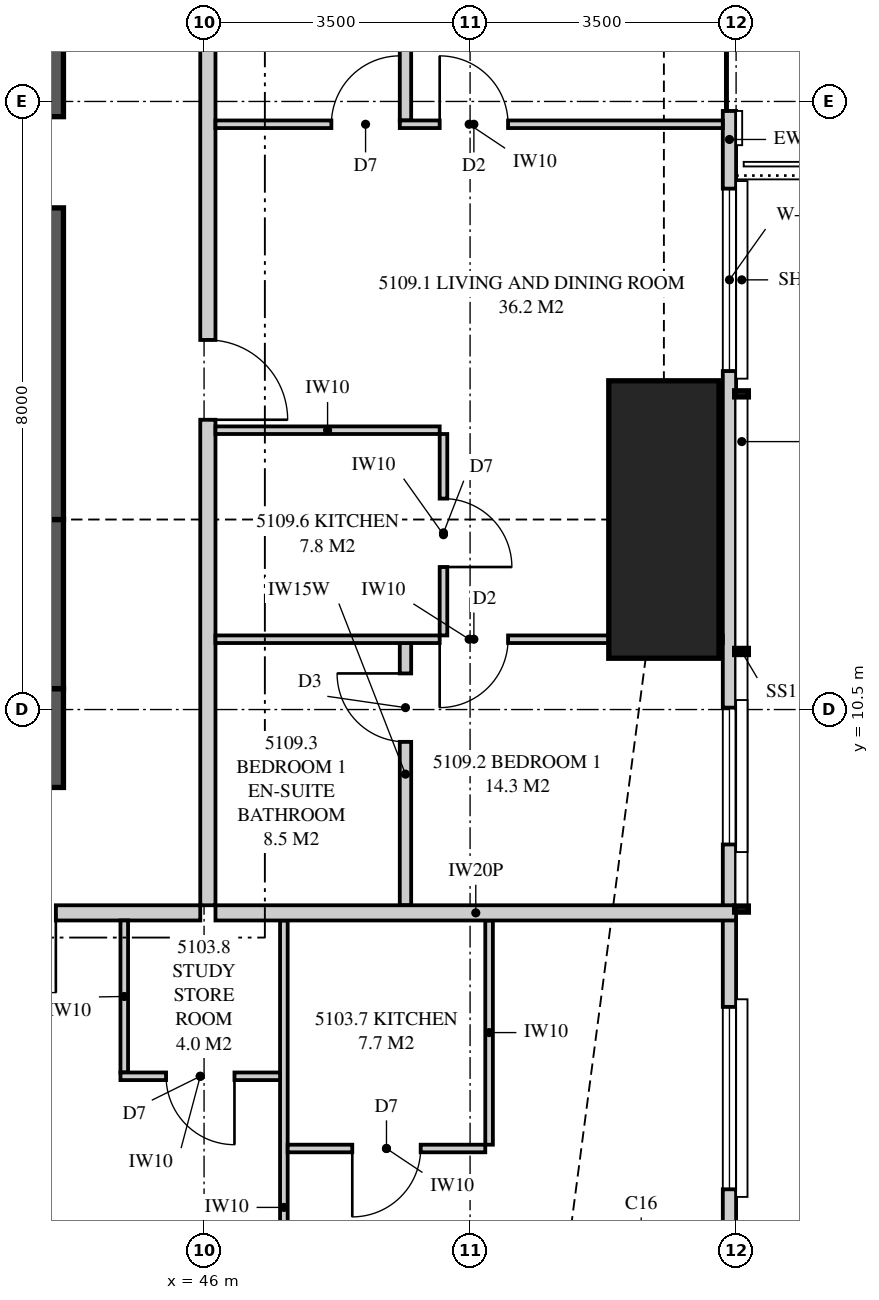
"""IFC4 building model, lengths in metres.
Left out: names, types, materials, properties, quantities, classifications, styles, units other than length and angle.
Written with IfcOpenShell. Run it as: python <this file> out.ifc"""

import sys

from ifc_helpers import new_model, si_unit, direction, frame, frame_2d, origin, origin_2d, place, context, subcontext, project, spatial, polyline, rectangle, outline, extrude, element, fill, save


model = new_model("IFC4")
c1 = context("Model", 3, precision=1e-05, world=origin(), true_north=direction((0.0, 1.0)))
c2 = subcontext(c1, "Body", "Model", "MODEL_VIEW")
j1 = project(units=[si_unit("LENGTHUNIT", "METRE"), si_unit("PLANEANGLEUNIT", "RADIAN")], contexts=[c1])
p1 = place(None, origin())
s1 = spatial("IfcSite", under=j1, at=p1, CompositionType="ELEMENT")
p2 = place(p1, origin())
s2 = spatial("IfcBuilding", under=s1, at=p2, CompositionType="ELEMENT")
p3 = place(p2, frame((0.0, 0.0, 187.85)))
s3 = spatial("IfcBuildingStorey", under=s2, at=p3, CompositionType="ELEMENT", Elevation=187.85)
p4 = place(p3, frame((52.05, 13.0, 0.0), z_axis=(0.0, 0.0, 1.0), x_axis=(1.0, 0.0, 0.0)))
e1 = element("IfcColumn", 1, at=p4, inside=s3, PredefinedType="COLUMN", context=c2, shape_type="SweptSolid", body=[
    extrude(rectangle(XDim=1.45, YDim=3.65, at=origin_2d()), origin(), (0.0, 0.0, 1.0), 3.35),
])
p5 = place(p3, frame((35.9, 10.125, 0.0), z_axis=(0.0, 0.0, 1.0), x_axis=(1.0, 0.0, 0.0)))
e2 = element("IfcWall", 2, at=p5, inside=s3, PredefinedType="SHEAR", context=c2, shape_type="SweptSolid", body=[
    extrude(rectangle(XDim=8.25, YDim=1.3, at=frame_2d((4.125, 0.0))), origin(), (0.0, 0.0, 1.0), 3.35),
])
p6 = place(p5, frame((2.7, 0.0, 0.0)))
e3 = element("IfcOpeningElement", 3, at=p6, cuts=e2, PredefinedType="OPENING", context=c2, shape_type="SweptSolid", body=[
    extrude(rectangle(XDim=1.0, YDim=2.1, at=frame_2d((0.5, 1.05))), frame((0.0, 0.66, 0.0), z_axis=(0.0, -1.0, 0.0), x_axis=(1.0, 0.0, 0.0)), (0.0, 0.0, 1.0), 1.32),
])
p7 = place(p3, frame((43.8, 10.775, 0.0), z_axis=(0.0, 0.0, 1.0), x_axis=(0.0, 1.0, 0.0)))
e4 = element("IfcWall", 4, at=p7, inside=s3, PredefinedType="SHEAR", context=c2, shape_type="SweptSolid", body=[
    extrude(rectangle(XDim=2.225, YDim=0.7, at=frame_2d((1.113, 0.0))), origin(), (0.0, 0.0, 1.0), 3.35),
])
p8 = place(p3, frame((43.8, 13.0, 0.0), z_axis=(0.0, 0.0, 1.0), x_axis=(0.0, 1.0, 0.0)))
e5 = element("IfcWall", 5, at=p8, inside=s3, PredefinedType="SHEAR", context=c2, shape_type="SweptSolid", body=[
    extrude(rectangle(XDim=6.3, YDim=0.7, at=frame_2d((3.15, 0.0))), origin(), (0.0, 0.0, 1.0), 3.35),
])
p9 = place(p8, frame((4.1, 0.0, 0.0)))
e6 = element("IfcOpeningElement", 6, at=p9, cuts=e5, PredefinedType="OPENING", context=c2, shape_type="SweptSolid", body=[
    extrude(rectangle(XDim=1.2, YDim=2.2, at=frame_2d((0.6, 1.1))), frame((0.0, 0.36, 0.0), z_axis=(0.0, -1.0, 0.0), x_axis=(1.0, 0.0, 0.0)), (0.0, 0.0, 1.0), 0.72),
])
p10 = place(p3, frame((52.913, 3.051, 0.0), z_axis=(0.0, 0.0, 1.0), x_axis=(0.0, 1.0, 0.0)))
e7 = element("IfcWall", 7, at=p10, inside=s3, PredefinedType="SOLIDWALL", context=c2, shape_type="SweptSolid", body=[
    extrude(outline(polyline([(0.0, 0.0), (29.897, 0.0), (29.897, 3.11), (22.167, 3.11), (22.167, 2.15), (22.074, 2.15), (22.074, 3.11), (21.949, 3.11), (21.949, 2.15), (9.949, 2.15), (9.949, 3.11), (9.847, 3.11), (9.847, 2.15), (9.706, 2.15), (9.706, 3.11), (0.0, 3.11), (0.0, 0.0)])), frame((0.0, 0.087, 0.0), z_axis=(0.0, -1.0, 0.0), x_axis=(1.0, 0.0, 0.0)), (0.0, 0.0, 1.0), 0.175),
])
p11 = place(p10, frame((1.137, 0.0, 0.4)))
e8 = element("IfcOpeningElement", 8, at=p11, cuts=e7, PredefinedType="OPENING", context=c2, shape_type="SweptSolid", body=[
    extrude(rectangle(XDim=2.4, YDim=1.7, at=frame_2d((1.2, 0.85))), frame((0.0, 0.097, 0.0), z_axis=(0.0, -1.0, 0.0), x_axis=(1.0, 0.0, 0.0)), (0.0, 0.0, 1.0), 0.195),
])
p12 = place(p10, frame((5.674, 0.0, 0.4)))
e9 = element("IfcOpeningElement", 9, at=p12, cuts=e7, PredefinedType="OPENING", context=c2, shape_type="SweptSolid", body=[
    extrude(rectangle(XDim=1.8, YDim=1.7, at=frame_2d((0.9, 0.85))), frame((0.0, 0.097, 0.0), z_axis=(0.0, -1.0, 0.0), x_axis=(1.0, 0.0, 0.0)), (0.0, 0.0, 1.0), 0.195),
])
p13 = place(p10, frame((11.902, 0.0, 0.4)))
e10 = element("IfcOpeningElement", 10, at=p13, cuts=e7, PredefinedType="OPENING", context=c2, shape_type="SweptSolid", body=[
    extrude(rectangle(XDim=2.4, YDim=1.7, at=frame_2d((1.2, 0.85))), frame((0.0, 0.097, 0.0), z_axis=(0.0, -1.0, 0.0), x_axis=(1.0, 0.0, 0.0)), (0.0, 0.0, 1.0), 0.195),
])
p14 = place(p10, frame((15.324, 0.0, 0.0)))
e11 = element("IfcOpeningElement", 11, at=p14, cuts=e7, PredefinedType="OPENING", context=c2, shape_type="SweptSolid", body=[
    extrude(rectangle(XDim=1.8, YDim=2.1, at=frame_2d((0.9, 1.05))), frame((0.0, 0.097, 0.0), z_axis=(0.0, -1.0, 0.0), x_axis=(1.0, 0.0, 0.0)), (0.0, 0.0, 1.0), 0.195),
])
p15 = place(p10, frame((23.874, 0.0, 0.4)))
e12 = element("IfcOpeningElement", 12, at=p15, cuts=e7, PredefinedType="OPENING", context=c2, shape_type="SweptSolid", body=[
    extrude(rectangle(XDim=1.8, YDim=1.7, at=frame_2d((0.9, 0.85))), frame((0.0, 0.097, 0.0), z_axis=(0.0, -1.0, 0.0), x_axis=(1.0, 0.0, 0.0)), (0.0, 0.0, 1.0), 0.195),
])
p16 = place(p10, frame((26.871, 0.0, 0.4)))
e13 = element("IfcOpeningElement", 13, at=p16, cuts=e7, PredefinedType="OPENING", context=c2, shape_type="SweptSolid", body=[
    extrude(rectangle(XDim=1.8, YDim=1.7, at=frame_2d((0.9, 0.85))), frame((0.0, 0.097, 0.0), z_axis=(0.0, -1.0, 0.0), x_axis=(1.0, 0.0, 0.0)), (0.0, 0.0, 1.0), 0.195),
])
p17 = place(p3, frame((34.1, 7.825, 0.0), z_axis=(0.0, 0.0, 1.0), x_axis=(1.0, 0.0, 0.0)))
e14 = element("IfcWall", 14, at=p17, inside=s3, PredefinedType="PARTITIONING", context=c2, shape_type="SweptSolid", body=[
    extrude(outline(polyline([(0.0, 0.0), (11.85, 0.0), (11.85, 3.11), (8.987, 3.11), (8.987, 2.541), (8.312, 2.541), (8.312, 3.11), (0.0, 3.11), (0.0, 0.0)])), frame((0.0, 0.1, 0.0), z_axis=(0.0, -1.0, 0.0), x_axis=(1.0, 0.0, 0.0)), (0.0, 0.0, 1.0), 0.2),
])
p18 = place(p17, frame((8.9, 0.0, 0.0)))
e15 = element("IfcOpeningElement", 15, at=p18, cuts=e14, PredefinedType="OPENING", context=c2, shape_type="SweptSolid", body=[
    extrude(rectangle(XDim=1.05, YDim=2.2, at=frame_2d((0.525, 1.1))), frame((0.0, 0.11, 0.0), z_axis=(0.0, -1.0, 0.0), x_axis=(1.0, 0.0, 0.0)), (0.0, 0.0, 1.0), 0.22),
])
p19 = place(p3, frame((47.05, 0.175, 0.0), z_axis=(0.0, 0.0, 1.0), x_axis=(0.0, 1.0, 0.0)))
e16 = element("IfcWall", 16, at=p19, inside=s3, PredefinedType="PARTITIONING", context=c2, shape_type="SweptSolid", body=[
    extrude(outline(polyline([(0.0, 0.0), (7.55, 0.0), (7.55, 3.11), (2.409, 3.11), (2.409, 2.15), (0.663, 2.15), (0.663, 3.11), (0.0, 3.11), (0.0, 0.0)])), frame((0.0, 0.05, 0.0), z_axis=(0.0, -1.0, 0.0), x_axis=(1.0, 0.0, 0.0)), (0.0, 0.0, 1.0), 0.1),
])
p20 = place(p19, frame((1.825, 0.0, 0.0)))
e17 = element("IfcOpeningElement", 17, at=p20, cuts=e16, PredefinedType="OPENING", context=c2, shape_type="SweptSolid", body=[
    extrude(rectangle(XDim=0.9, YDim=2.1, at=frame_2d((0.45, 1.05))), frame((0.0, 0.06, 0.0), z_axis=(0.0, -1.0, 0.0), x_axis=(1.0, 0.0, 0.0)), (0.0, 0.0, 1.0), 0.12),
])
p21 = place(p3, frame((47.1, 4.725, 0.0), z_axis=(0.0, 0.0, 1.0), x_axis=(1.0, 0.0, 0.0)))
e18 = element("IfcWall", 18, at=p21, inside=s3, PredefinedType="PARTITIONING", context=c2, shape_type="SweptSolid", body=[
    extrude(rectangle(XDim=2.6, YDim=0.1, at=frame_2d((1.3, 0.0))), origin(), (0.0, 0.0, 1.0), 3.11),
])
p22 = place(p21, frame((0.85, 0.0, 0.0)))
e19 = element("IfcOpeningElement", 19, at=p22, cuts=e18, PredefinedType="OPENING", context=c2, shape_type="SweptSolid", body=[
    extrude(rectangle(XDim=0.9, YDim=2.1, at=frame_2d((0.45, 1.05))), frame((0.0, 0.06, 0.0), z_axis=(0.0, -1.0, 0.0), x_axis=(1.0, 0.0, 0.0)), (0.0, 0.0, 1.0), 0.12),
])
p23 = place(p3, frame((49.75, 4.775, 0.0), z_axis=(0.0, 0.0, 1.0), x_axis=(0.0, 1.0, 0.0)))
e20 = element("IfcWall", 20, at=p23, inside=s3, PredefinedType="PARTITIONING", context=c2, shape_type="SweptSolid", body=[
    extrude(rectangle(XDim=2.95, YDim=0.1, at=frame_2d((1.475, 0.0))), origin(), (0.0, 0.0, 1.0), 3.11),
])
p24 = place(p3, frame((46.15, 7.825, 0.0), z_axis=(0.0, 0.0, 1.0), x_axis=(1.0, 0.0, 0.0)))
e21 = element("IfcWall", 21, at=p24, inside=s3, PredefinedType="PARTITIONING", context=c2, shape_type="SweptSolid", body=[
    extrude(outline(polyline([(0.0, 0.0), (6.85, 0.0), (6.85, 3.11), (6.138, 3.11), (6.138, 2.15), (4.303, 2.15), (4.303, 3.11), (0.0, 3.11), (0.0, 0.0)])), frame((0.0, 0.1, 0.0), z_axis=(0.0, -1.0, 0.0), x_axis=(1.0, 0.0, 0.0)), (0.0, 0.0, 1.0), 0.2),
])
p25 = place(p3, frame((46.05, 7.925, 0.0), z_axis=(0.0, 0.0, 1.0), x_axis=(0.0, 1.0, 0.0)))
e22 = element("IfcWall", 22, at=p25, inside=s3, PredefinedType="PARTITIONING", context=c2, shape_type="SweptSolid", body=[
    extrude(outline(polyline([(0.0, 0.0), (13.775, 0.0), (13.775, 3.11), (5.412, 3.11), (5.412, 2.541), (4.738, 2.541), (4.738, 3.11), (0.0, 3.11), (0.0, 0.0)])), frame((0.0, 0.1, 0.0), z_axis=(0.0, -1.0, 0.0), x_axis=(1.0, 0.0, 0.0)), (0.0, 0.0, 1.0), 0.2),
])
p26 = place(p25, frame((6.387, 0.0, 0.0)))
e23 = element("IfcOpeningElement", 23, at=p26, cuts=e22, PredefinedType="OPENING", context=c2, shape_type="SweptSolid", body=[
    extrude(rectangle(XDim=1.05, YDim=2.2, at=frame_2d((0.525, 1.1))), frame((0.0, 0.11, 0.0), z_axis=(0.0, -1.0, 0.0), x_axis=(1.0, 0.0, 0.0)), (0.0, 0.0, 1.0), 0.22),
])
p27 = place(p3, frame((52.825, 11.425, 0.0), z_axis=(0.0, 0.0, 1.0), x_axis=(-1.0, 0.0, 0.0)))
e24 = element("IfcWall", 24, at=p27, inside=s3, PredefinedType="PARTITIONING", context=c2, shape_type="SweptSolid", body=[
    extrude(outline(polyline([(0.0, 0.0), (6.675, 0.0), (6.675, 3.11), (1.849, 3.11), (1.849, 2.15), (0.115, 2.15), (0.115, 3.11), (0.0, 3.11), (0.0, 0.0)])), frame((0.0, 0.05, 0.0), z_axis=(0.0, -1.0, 0.0), x_axis=(1.0, 0.0, 0.0)), (0.0, 0.0, 1.0), 0.1),
])
p28 = place(p27, frame((2.825, 0.0, 0.0)))
e25 = element("IfcOpeningElement", 25, at=p28, cuts=e24, PredefinedType="OPENING", context=c2, shape_type="SweptSolid", body=[
    extrude(rectangle(XDim=0.9, YDim=2.1, at=frame_2d((0.45, 1.05))), frame((0.0, 0.06, 0.0), z_axis=(0.0, -1.0, 0.0), x_axis=(1.0, 0.0, 0.0)), (0.0, 0.0, 1.0), 0.12),
])
p29 = place(p3, frame((52.825, 18.2, 0.0), z_axis=(0.0, 0.0, 1.0), x_axis=(-1.0, 0.0, 0.0)))
e26 = element("IfcWall", 26, at=p29, inside=s3, PredefinedType="PARTITIONING", context=c2, shape_type="SweptSolid", body=[
    extrude(outline(polyline([(0.0, 0.0), (6.675, 0.0), (6.675, 3.11), (1.635, 3.11), (1.635, 2.15), (0.0, 2.15), (0.0, 3.11), (0.0, 0.0)])), frame((0.0, 0.05, 0.0), z_axis=(0.0, -1.0, 0.0), x_axis=(1.0, 0.0, 0.0)), (0.0, 0.0, 1.0), 0.1),
])
p30 = place(p29, frame((2.825, 0.0, 0.0)))
e27 = element("IfcOpeningElement", 27, at=p30, cuts=e26, PredefinedType="OPENING", context=c2, shape_type="SweptSolid", body=[
    extrude(rectangle(XDim=0.9, YDim=2.1, at=frame_2d((0.45, 1.05))), frame((0.0, 0.06, 0.0), z_axis=(0.0, -1.0, 0.0), x_axis=(1.0, 0.0, 0.0)), (0.0, 0.0, 1.0), 0.12),
])
p31 = place(p29, frame((4.25, 0.0, 0.0)))
e28 = element("IfcOpeningElement", 28, at=p31, cuts=e26, PredefinedType="OPENING", context=c2, shape_type="SweptSolid", body=[
    extrude(rectangle(XDim=0.9, YDim=2.1, at=frame_2d((0.45, 1.05))), frame((0.0, 0.06, 0.0), z_axis=(0.0, -1.0, 0.0), x_axis=(1.0, 0.0, 0.0)), (0.0, 0.0, 1.0), 0.12),
])
p32 = place(p3, frame((48.65, 7.925, 0.0), z_axis=(0.0, 0.0, 1.0), x_axis=(0.0, 1.0, 0.0)))
e29 = element("IfcWall", 29, at=p32, inside=s3, PredefinedType="PLUMBINGWALL", context=c2, shape_type="SweptSolid", body=[
    extrude(rectangle(XDim=3.45, YDim=0.15, at=frame_2d((1.725, 0.0))), origin(), (0.0, 0.0, 1.0), 3.11),
])
p33 = place(p32, frame((2.15, 0.0, 0.0)))
e30 = element("IfcOpeningElement", 30, at=p33, cuts=e29, PredefinedType="OPENING", context=c2, shape_type="SweptSolid", body=[
    extrude(rectangle(XDim=0.9, YDim=2.1, at=frame_2d((0.45, 1.05))), frame((0.0, 0.085, 0.0), z_axis=(0.0, -1.0, 0.0), x_axis=(1.0, 0.0, 0.0)), (0.0, 0.0, 1.0), 0.17),
])
p34 = place(p3, frame((48.65, 18.25, 0.0), z_axis=(0.0, 0.0, 1.0), x_axis=(0.0, 1.0, 0.0)))
e31 = element("IfcWall", 31, at=p34, inside=s3, PredefinedType="PLUMBINGWALL", context=c2, shape_type="SweptSolid", body=[
    extrude(rectangle(XDim=3.45, YDim=0.15, at=frame_2d((1.725, 0.0))), origin(), (0.0, 0.0, 1.0), 3.11),
])
p35 = place(p3, frame((49.15, 11.475, 0.0), z_axis=(0.0, 0.0, 1.0), x_axis=(0.0, 1.0, 0.0)))
e32 = element("IfcWall", 32, at=p35, inside=s3, PredefinedType="PARTITIONING", context=c2, shape_type="SweptSolid", body=[
    extrude(outline(polyline([(0.0, 0.0), (2.65, 0.0), (2.65, 3.11), (1.812, 3.11), (1.812, 2.541), (1.238, 2.541), (1.238, 3.11), (0.0, 3.11), (0.0, 0.0)])), frame((0.0, 0.05, 0.0), z_axis=(0.0, -1.0, 0.0), x_axis=(1.0, 0.0, 0.0)), (0.0, 0.0, 1.0), 0.1),
])
p36 = place(p35, frame((0.9, 0.0, 0.0)))
e33 = element("IfcOpeningElement", 33, at=p36, cuts=e32, PredefinedType="OPENING", context=c2, shape_type="SweptSolid", body=[
    extrude(rectangle(XDim=0.9, YDim=2.1, at=frame_2d((0.45, 1.05))), frame((0.0, 0.06, 0.0), z_axis=(0.0, -1.0, 0.0), x_axis=(1.0, 0.0, 0.0)), (0.0, 0.0, 1.0), 0.12),
])
p37 = place(p3, frame((49.1, 14.175, 0.0), z_axis=(0.0, 0.0, 1.0), x_axis=(-1.0, 0.0, 0.0)))
e34 = element("IfcWall", 34, at=p37, inside=s3, PredefinedType="PARTITIONING", context=c2, shape_type="SweptSolid", body=[
    extrude(rectangle(XDim=2.95, YDim=0.1, at=frame_2d((1.475, 0.0))), origin(), (0.0, 0.0, 1.0), 3.11),
])
p38 = place(p3, frame((47.0, 5.675, 0.0), z_axis=(0.0, 0.0, 1.0), x_axis=(-1.0, 0.0, 0.0)))
e35 = element("IfcWall", 35, at=p38, inside=s3, PredefinedType="PARTITIONING", context=c2, shape_type="SweptSolid", body=[
    extrude(rectangle(XDim=2.1, YDim=0.1, at=frame_2d((1.05, 0.0))), origin(), (0.0, 0.0, 1.0), 3.11),
])
p39 = place(p38, frame((0.6, 0.0, 0.0)))
e36 = element("IfcOpeningElement", 36, at=p39, cuts=e35, PredefinedType="OPENING", context=c2, shape_type="SweptSolid", body=[
    extrude(rectangle(XDim=0.9, YDim=2.1, at=frame_2d((0.45, 1.05))), frame((0.0, 0.06, 0.0), z_axis=(0.0, -1.0, 0.0), x_axis=(1.0, 0.0, 0.0)), (0.0, 0.0, 1.0), 0.12),
])
p40 = place(p3, frame((44.95, 7.725, 0.0), z_axis=(0.0, 0.0, 1.0), x_axis=(0.0, -1.0, 0.0)))
e37 = element("IfcWall", 37, at=p40, inside=s3, PredefinedType="PARTITIONING", context=c2, shape_type="SweptSolid", body=[
    extrude(rectangle(XDim=2.0, YDim=0.1, at=frame_2d((1.0, 0.0))), origin(), (0.0, 0.0, 1.0), 3.11),
])
p41 = place(p11, origin())
e38 = element("IfcWindow", 38, at=p41, inside=s3, PartitioningType="SINGLE_PANEL", PredefinedType="WINDOW", context=c2, shape_type="SweptSolid", body=[
    extrude(rectangle(XDim=2.4, YDim=1.7, at=frame_2d((1.2, 0.85))), frame((0.0, 0.03, 0.0), z_axis=(0.0, -1.0, 0.0), x_axis=(1.0, 0.0, 0.0)), (0.0, 0.0, 1.0), 0.06),
])
fill(e8, e38)
p42 = place(p12, origin())
e39 = element("IfcWindow", 39, at=p42, inside=s3, PartitioningType="SINGLE_PANEL", PredefinedType="WINDOW", context=c2, shape_type="SweptSolid", body=[
    extrude(rectangle(XDim=1.8, YDim=1.7, at=frame_2d((0.9, 0.85))), frame((0.0, 0.03, 0.0), z_axis=(0.0, -1.0, 0.0), x_axis=(1.0, 0.0, 0.0)), (0.0, 0.0, 1.0), 0.06),
])
fill(e9, e39)
p43 = place(p13, origin())
e40 = element("IfcWindow", 40, at=p43, inside=s3, PartitioningType="SINGLE_PANEL", PredefinedType="WINDOW", context=c2, shape_type="SweptSolid", body=[
    extrude(rectangle(XDim=2.4, YDim=1.7, at=frame_2d((1.2, 0.85))), frame((0.0, 0.03, 0.0), z_axis=(0.0, -1.0, 0.0), x_axis=(1.0, 0.0, 0.0)), (0.0, 0.0, 1.0), 0.06),
])
fill(e10, e40)
p44 = place(p14, origin())
e41 = element("IfcDoor", 41, at=p44, inside=s3, OperationType="SLIDING_TO_LEFT", PredefinedType="DOOR", context=c2, shape_type="SweptSolid", body=[
    extrude(rectangle(XDim=1.8, YDim=2.1, at=frame_2d((0.9, 1.05))), frame((0.0, 0.025, 0.0), z_axis=(0.0, -1.0, 0.0), x_axis=(1.0, 0.0, 0.0)), (0.0, 0.0, 1.0), 0.05),
])
fill(e11, e41)
p45 = place(p18, frame((1.05, 0.0, 0.0), z_axis=(0.0, 0.0, 1.0), x_axis=(-1.0, 0.0, 0.0)))
e42 = element("IfcDoor", 42, at=p45, inside=s3, OperationType="SINGLE_SWING_LEFT", PredefinedType="DOOR", context=c2, shape_type="SweptSolid", body=[
    extrude(rectangle(XDim=1.05, YDim=2.2, at=frame_2d((0.525, 1.1))), frame((0.0, 0.025, 0.0), z_axis=(0.0, -1.0, 0.0), x_axis=(1.0, 0.0, 0.0)), (0.0, 0.0, 1.0), 0.05),
])
fill(e15, e42)
p46 = place(p22, frame((0.9, 0.0, 0.0), z_axis=(0.0, 0.0, 1.0), x_axis=(-1.0, 0.0, 0.0)))
e43 = element("IfcDoor", 43, at=p46, inside=s3, OperationType="SINGLE_SWING_RIGHT", PredefinedType="DOOR", context=c2, shape_type="SweptSolid", body=[
    extrude(rectangle(XDim=0.9, YDim=2.1, at=frame_2d((0.45, 1.05))), frame((0.0, 0.025, 0.0), z_axis=(0.0, -1.0, 0.0), x_axis=(1.0, 0.0, 0.0)), (0.0, 0.0, 1.0), 0.05),
])
fill(e19, e43)
p47 = place(p26, frame((1.05, 0.0, 0.0), z_axis=(0.0, 0.0, 1.0), x_axis=(-1.0, 0.0, 0.0)))
e44 = element("IfcDoor", 44, at=p47, inside=s3, OperationType="SINGLE_SWING_RIGHT", PredefinedType="DOOR", context=c2, shape_type="SweptSolid", body=[
    extrude(rectangle(XDim=1.05, YDim=2.2, at=frame_2d((0.525, 1.1))), frame((0.0, 0.025, 0.0), z_axis=(0.0, -1.0, 0.0), x_axis=(1.0, 0.0, 0.0)), (0.0, 0.0, 1.0), 0.05),
])
fill(e23, e44)
p48 = place(p28, origin())
e45 = element("IfcDoor", 45, at=p48, inside=s3, OperationType="SINGLE_SWING_RIGHT", PredefinedType="DOOR", context=c2, shape_type="SweptSolid", body=[
    extrude(rectangle(XDim=0.9, YDim=2.1, at=frame_2d((0.45, 1.05))), frame((0.0, 0.025, 0.0), z_axis=(0.0, -1.0, 0.0), x_axis=(1.0, 0.0, 0.0)), (0.0, 0.0, 1.0), 0.05),
])
fill(e25, e45)
p49 = place(p33, origin())
e46 = element("IfcDoor", 46, at=p49, inside=s3, OperationType="SINGLE_SWING_RIGHT", PredefinedType="DOOR", context=c2, shape_type="SweptSolid", body=[
    extrude(rectangle(XDim=0.9, YDim=2.1, at=frame_2d((0.45, 1.05))), frame((0.0, 0.025, 0.0), z_axis=(0.0, -1.0, 0.0), x_axis=(1.0, 0.0, 0.0)), (0.0, 0.0, 1.0), 0.05),
])
fill(e30, e46)
p50 = place(p30, frame((0.9, 0.0, 0.0), z_axis=(0.0, 0.0, 1.0), x_axis=(-1.0, 0.0, 0.0)))
e47 = element("IfcDoor", 47, at=p50, inside=s3, OperationType="SINGLE_SWING_LEFT", PredefinedType="DOOR", context=c2, shape_type="SweptSolid", body=[
    extrude(rectangle(XDim=0.9, YDim=2.1, at=frame_2d((0.45, 1.05))), frame((0.0, 0.025, 0.0), z_axis=(0.0, -1.0, 0.0), x_axis=(1.0, 0.0, 0.0)), (0.0, 0.0, 1.0), 0.05),
])
fill(e27, e47)
p51 = place(p31, frame((0.9, 0.0, 0.0), z_axis=(0.0, 0.0, 1.0), x_axis=(-1.0, 0.0, 0.0)))
e48 = element("IfcDoor", 48, at=p51, inside=s3, OperationType="SINGLE_SWING_RIGHT", PredefinedType="DOOR", context=c2, shape_type="SweptSolid", body=[
    extrude(rectangle(XDim=0.9, YDim=2.1, at=frame_2d((0.45, 1.05))), frame((0.0, 0.025, 0.0), z_axis=(0.0, -1.0, 0.0), x_axis=(1.0, 0.0, 0.0)), (0.0, 0.0, 1.0), 0.05),
])
fill(e28, e48)
p52 = place(p36, frame((0.9, 0.0, 0.0), z_axis=(0.0, 0.0, 1.0), x_axis=(-1.0, 0.0, 0.0)))
e49 = element("IfcDoor", 49, at=p52, inside=s3, OperationType="SINGLE_SWING_RIGHT", PredefinedType="DOOR", context=c2, shape_type="SweptSolid", body=[
    extrude(rectangle(XDim=0.9, YDim=2.1, at=frame_2d((0.45, 1.05))), frame((0.0, 0.025, 0.0), z_axis=(0.0, -1.0, 0.0), x_axis=(1.0, 0.0, 0.0)), (0.0, 0.0, 1.0), 0.05),
])
fill(e33, e49)
p53 = place(p39, origin())
e50 = element("IfcDoor", 50, at=p53, inside=s3, OperationType="SINGLE_SWING_LEFT", PredefinedType="DOOR", context=c2, shape_type="SweptSolid", body=[
    extrude(rectangle(XDim=0.9, YDim=2.1, at=frame_2d((0.45, 1.05))), frame((0.0, 0.025, 0.0), z_axis=(0.0, -1.0, 0.0), x_axis=(1.0, 0.0, 0.0)), (0.0, 0.0, 1.0), 0.05),
])
fill(e36, e50)
save(model, sys.argv[1])
